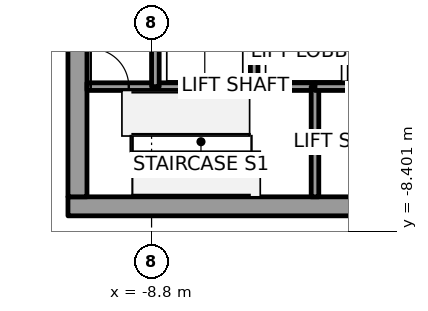
"""IFC4 building model, lengths in metres.
Left out: names, types, materials, properties, quantities, classifications, styles, units other than length and angle.
Written with IfcOpenShell. Run it as: python <this file> out.ifc"""

import sys

from ifc_helpers import new_model, si_unit, direction, frame, frame_2d, origin, place, context, subcontext, project, spatial, rectangle, extrude, element, fill, save


model = new_model("IFC4")
c1 = context("Model", 3, precision=1e-05, world=origin(), true_north=direction((0.0, 1.0)))
c2 = subcontext(c1, "Body", "Model", "MODEL_VIEW")
j1 = project(units=[si_unit("LENGTHUNIT", "METRE"), si_unit("PLANEANGLEUNIT", "RADIAN")], contexts=[c1])
p1 = place(None, origin())
s1 = spatial("IfcSite", under=j1, at=p1, CompositionType="ELEMENT")
p2 = place(p1, origin())
s2 = spatial("IfcBuilding", under=s1, at=p2, CompositionType="ELEMENT")
p3 = place(p2, frame((0.0, 0.0, 169.8)))
s3 = spatial("IfcBuildingStorey", under=s2, at=p3, CompositionType="ELEMENT", Elevation=169.8)
p4 = place(p3, frame((-11.0, -7.75, 0.0), z_axis=(0.0, 0.0, 1.0), x_axis=(1.0, 0.0, 0.0)))
e1 = element("IfcWall", 1, at=p4, inside=s3, PredefinedType="SHEAR", context=c2, shape_type="SweptSolid", body=[
    extrude(rectangle(XDim=22.0, YDim=0.5, at=frame_2d((11.0, 0.0))), origin(), (0.0, 0.0, 1.0), 4.0),
])
p5 = place(p4, frame((10.45, 0.0, 0.0)))
e2 = element("IfcOpeningElement", 2, at=p5, cuts=e1, PredefinedType="OPENING", context=c2, shape_type="SweptSolid", body=[
    extrude(rectangle(XDim=1.1, YDim=2.1, at=frame_2d((0.55, 1.05))), frame((0.0, 0.25, 0.0), z_axis=(0.0, -1.0, 0.0), x_axis=(1.0, 0.0, 0.0)), (0.0, 0.0, 1.0), 0.5),
])
p6 = place(p3, frame((-10.75, -7.5, 0.0), z_axis=(0.0, 0.0, 1.0), x_axis=(0.0, 1.0, 0.0)))
e3 = element("IfcWall", 3, at=p6, inside=s3, PredefinedType="SHEAR", context=c2, shape_type="SweptSolid", body=[
    extrude(rectangle(XDim=15.0, YDim=0.5, at=frame_2d((7.5, 0.0))), origin(), (0.0, 0.0, 1.0), 4.0),
])
p7 = place(p6, frame((6.6, 0.0, 0.0)))
e4 = element("IfcOpeningElement", 4, at=p7, cuts=e3, PredefinedType="OPENING", context=c2, shape_type="SweptSolid", body=[
    extrude(rectangle(XDim=1.8, YDim=2.1, at=frame_2d((0.9, 1.05))), frame((0.0, 0.25, 0.0), z_axis=(0.0, -1.0, 0.0), x_axis=(1.0, 0.0, 0.0)), (0.0, 0.0, 1.0), 0.5),
])
p8 = place(p3, frame((-10.5, -4.6, 0.0), z_axis=(0.0, 0.0, 1.0), x_axis=(1.0, 0.0, 0.0)))
e5 = element("IfcWall", 5, at=p8, inside=s3, PredefinedType="SOLIDWALL", context=c2, shape_type="SweptSolid", body=[
    extrude(rectangle(XDim=1.8, YDim=0.2, at=frame_2d((0.9, 0.0))), origin(), (0.0, 0.0, 1.0), 3.85),
])
p9 = place(p8, frame((0.1, 0.0, 0.0)))
e6 = element("IfcOpeningElement", 6, at=p9, cuts=e5, PredefinedType="OPENING", context=c2, shape_type="SweptSolid", body=[
    extrude(rectangle(XDim=1.0, YDim=2.1, at=frame_2d((0.5, 1.05))), frame((0.0, 0.1, 0.0), z_axis=(0.0, -1.0, 0.0), x_axis=(1.0, 0.0, 0.0)), (0.0, 0.0, 1.0), 0.2),
])
p10 = place(p3, frame((-8.7, -4.6, 0.0), z_axis=(0.0, 0.0, 1.0), x_axis=(1.0, 0.0, 0.0)))
e7 = element("IfcWall", 7, at=p10, inside=s3, PredefinedType="SOLIDWALL", context=c2, shape_type="SweptSolid", body=[
    extrude(rectangle(XDim=2.6, YDim=0.2, at=frame_2d((1.3, 0.0))), origin(), (0.0, 0.0, 1.0), 3.85),
])
p11 = place(p3, frame((-8.7, -4.6, 0.0), z_axis=(0.0, 0.0, 1.0), x_axis=(0.0, 1.0, 0.0)))
e8 = element("IfcWall", 8, at=p11, inside=s3, PredefinedType="SOLIDWALL", context=c2, shape_type="SweptSolid", body=[
    extrude(rectangle(XDim=2.8, YDim=0.2, at=frame_2d((1.4, 0.0))), origin(), (0.0, 0.0, 1.0), 3.85),
])
p12 = place(p3, frame((-6.1, -4.6, 0.0), z_axis=(0.0, 0.0, 1.0), x_axis=(1.0, 0.0, 0.0)))
e9 = element("IfcWall", 9, at=p12, inside=s3, PredefinedType="SOLIDWALL", context=c2, shape_type="SweptSolid", body=[
    extrude(rectangle(XDim=1.6, YDim=0.2, at=frame_2d((0.8, 0.0))), origin(), (0.0, 0.0, 1.0), 3.85),
])
p13 = place(p3, frame((-6.1, -4.6, 0.0), z_axis=(0.0, 0.0, 1.0), x_axis=(0.0, 1.0, 0.0)))
e10 = element("IfcWall", 10, at=p13, inside=s3, PredefinedType="SOLIDWALL", context=c2, shape_type="SweptSolid", body=[
    extrude(rectangle(XDim=2.8, YDim=0.2, at=frame_2d((1.4, 0.0))), origin(), (0.0, 0.0, 1.0), 3.85),
])
p14 = place(p3, frame((-4.5, -4.6, 0.0), z_axis=(0.0, 0.0, 1.0), x_axis=(0.0, -1.0, 0.0)))
e11 = element("IfcWall", 11, at=p14, inside=s3, PredefinedType="SOLIDWALL", context=c2, shape_type="SweptSolid", body=[
    extrude(rectangle(XDim=2.9, YDim=0.2, at=frame_2d((1.45, 0.0))), origin(), (0.0, 0.0, 1.0), 3.85),
])
p15 = place(p3, frame((-4.5, -4.6, 0.0), z_axis=(0.0, 0.0, 1.0), x_axis=(1.0, 0.0, 0.0)))
e12 = element("IfcWall", 12, at=p15, inside=s3, PredefinedType="SOLIDWALL", context=c2, shape_type="SweptSolid", body=[
    extrude(rectangle(XDim=1.0, YDim=0.2, at=frame_2d((0.5, 0.0))), origin(), (0.0, 0.0, 1.0), 3.85),
])
p16 = place(p9, origin())
e13 = element("IfcDoor", 13, at=p16, inside=s3, OperationType="SINGLE_SWING_LEFT", PredefinedType="DOOR", context=c2, shape_type="SweptSolid", body=[
    extrude(rectangle(XDim=1.0, YDim=2.1, at=frame_2d((0.5, 1.05))), frame((0.0, 0.025, 0.0), z_axis=(0.0, -1.0, 0.0), x_axis=(1.0, 0.0, 0.0)), (0.0, 0.0, 1.0), 0.05),
])
fill(e6, e13)
save(model, sys.argv[1])
